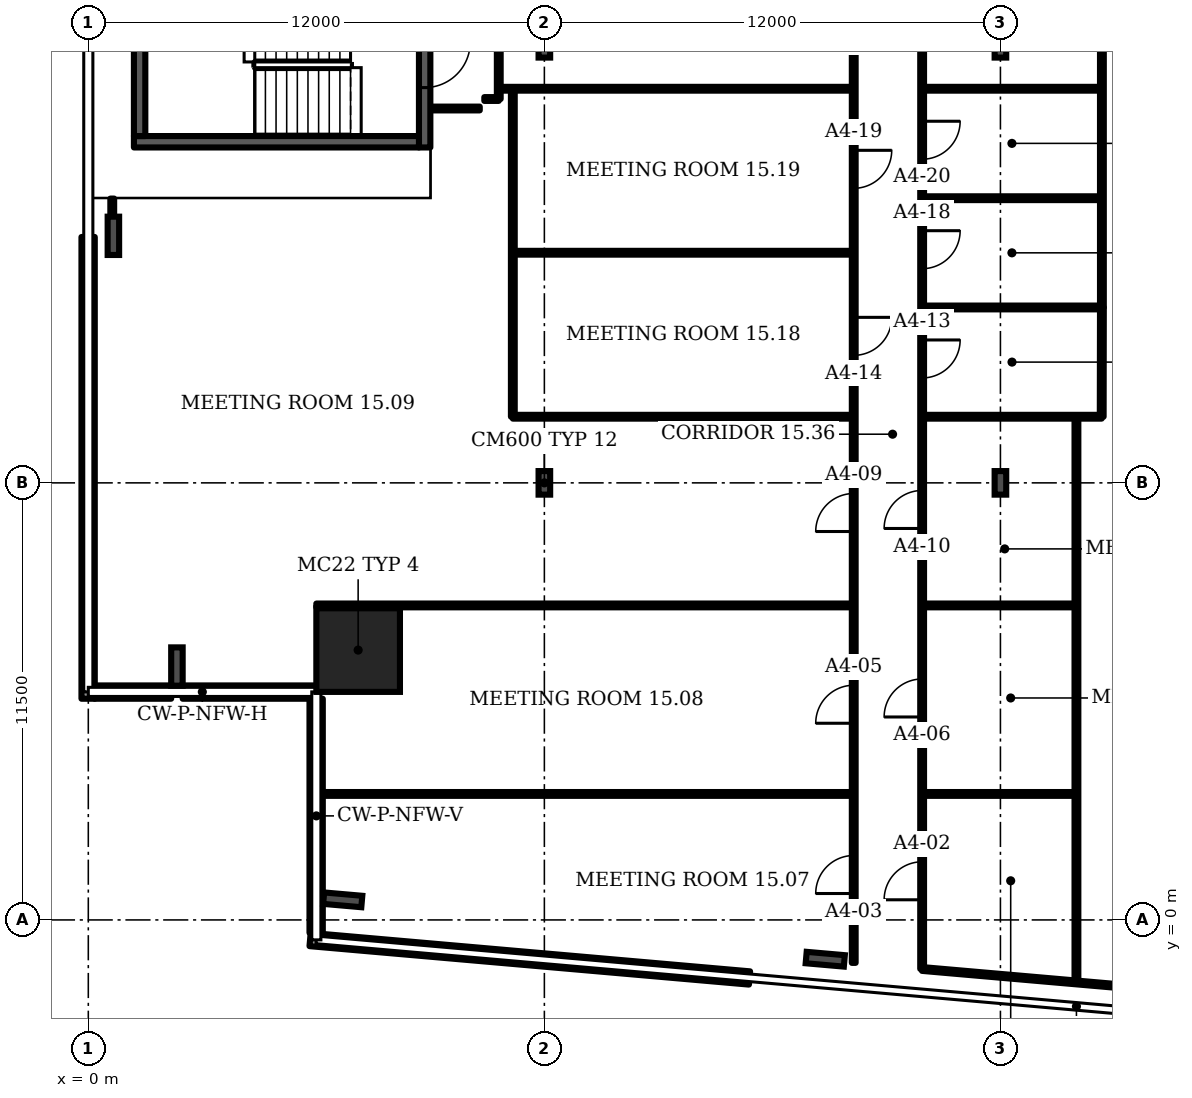
"""IFC4 building model, lengths in metres.
Left out: names, types, materials, properties, quantities, classifications, styles, units other than length and angle.
Written with IfcOpenShell. Run it as: python <this file> out.ifc"""

import sys

from ifc_helpers import new_model, si_unit, direction, frame, frame_2d, origin, origin_2d, place, context, subcontext, project, spatial, rectangle, i_section, extrude, element, fill, save


model = new_model("IFC4")
c1 = context("Model", 3, precision=1e-05, world=origin(), true_north=direction((0.0, 1.0)))
c2 = subcontext(c1, "Body", "Model", "MODEL_VIEW")
j1 = project(units=[si_unit("LENGTHUNIT", "METRE"), si_unit("PLANEANGLEUNIT", "RADIAN")], contexts=[c1])
p1 = place(None, origin())
s1 = spatial("IfcSite", under=j1, at=p1, CompositionType="ELEMENT")
p2 = place(p1, origin())
s2 = spatial("IfcBuilding", under=s1, at=p2, CompositionType="ELEMENT")
p3 = place(p2, frame((0.0, 0.0, 73.9)))
s3 = spatial("IfcBuildingStorey", under=s2, at=p3, CompositionType="ELEMENT", Elevation=73.9)
p4 = place(p3, frame((7.1, 7.1, 0.0), z_axis=(0.0, 0.0, 1.0), x_axis=(1.0, 0.0, 0.0)))
e1 = element("IfcColumn", 1, at=p4, inside=s3, PredefinedType="COLUMN", context=c2, shape_type="SweptSolid", body=[
    extrude(rectangle(XDim=2.2, YDim=2.2, at=origin_2d()), origin(), (0.0, 0.0, 1.0), 3.6),
])
for number, where, z_axis, x_axis in (
    (2, (6.694, 0.529, 0.0), (0.0, 0.0, 1.0), (-0.087, -0.996, 0.0)),
    (3, (19.391, -1.034, 0.0), (0.0, 0.0, 1.0), (-0.087, -0.996, 0.0)),
    (4, (0.66, 18.0, 0.0), (0.0, 0.0, 1.0), (-1.0, 0.0, 0.0)),
    (5, (2.332, 6.667, 0.0), (0.0, 0.0, 1.0), (-1.0, 0.0, 0.0)),
):
    element("IfcColumn", number, at=place(p3, frame(where, z_axis=z_axis, x_axis=x_axis)), inside=s3, PredefinedType="COLUMN", context=c2, shape_type="SweptSolid", body=[
        extrude(i_section(OverallWidth=0.302, OverallDepth=1.008, WebThickness=0.021, FlangeThickness=0.04, FilletRadius=0.03, at=origin_2d()), origin(), (0.0, 0.0, 1.0), 3.6),
    ])
for number, where, z_axis, x_axis in (
    (6, (12.0, 11.5, 0.0), (0.0, 0.0, 1.0), (1.0, 0.0, 0.0)),
    (7, (24.0, 11.5, 0.0), (0.0, 0.0, 1.0), (1.0, 0.0, 0.0)),
    (8, (12.0, 23.0, 0.0), (0.0, 0.0, 1.0), (1.0, 0.0, 0.0)),
    (9, (24.0, 23.0, 0.0), (0.0, 0.0, 1.0), (1.0, 0.0, 0.0)),
):
    element("IfcColumn", number, at=place(p3, frame(where, z_axis=z_axis, x_axis=x_axis)), inside=s3, PredefinedType="COLUMN", context=c2, shape_type="SweptSolid", body=[
        extrude(i_section(OverallWidth=0.305, OverallDepth=0.62, WebThickness=0.021, FlangeThickness=0.04, FilletRadius=0.027, at=origin_2d()), origin(), (0.0, 0.0, 1.0), 3.6),
    ])
p5 = place(p3, frame((5.835, -0.516, 0.0), z_axis=(0.0, 0.0, 1.0), x_axis=(0.996192, -0.087142, 0.0)))
e10 = element("IfcWall", 10, at=p5, inside=s3, PredefinedType="SOLIDWALL", context=c2, shape_type="SweptSolid", body=[
    extrude(rectangle(XDim=11.607, YDim=0.35, at=frame_2d((5.804, 0.0))), origin(), (0.0, 0.0, 1.0), 1.0),
])
p6 = place(p3, frame((-0.005, 17.97, 0.0), z_axis=(0.0, 0.0, 1.0), x_axis=(0.0, -1.0, 0.0)))
e11 = element("IfcWall", 11, at=p6, inside=s3, PredefinedType="SOLIDWALL", context=c2, shape_type="SweptSolid", body=[
    extrude(rectangle(XDim=12.15, YDim=0.35, at=frame_2d((6.075, 0.0))), origin(), (0.0, 0.0, 1.0), 1.0),
])
p7 = place(p3, frame((0.17, 5.995, 0.0), z_axis=(0.0, 0.0, 1.0), x_axis=(1.0, 0.0, 0.0)))
e12 = element("IfcWall", 12, at=p7, inside=s3, PredefinedType="SOLIDWALL", context=c2, shape_type="SweptSolid", body=[
    extrude(rectangle(XDim=2.011, YDim=0.35, at=frame_2d((1.005, 0.0))), origin(), (0.0, 0.0, 1.0), 1.0),
])
p8 = place(p3, frame((2.483, 5.995, 0.0), z_axis=(0.0, 0.0, 1.0), x_axis=(1.0, 0.0, 0.0)))
e13 = element("IfcWall", 13, at=p8, inside=s3, PredefinedType="SOLIDWALL", context=c2, shape_type="SweptSolid", body=[
    extrude(rectangle(XDim=3.517, YDim=0.35, at=frame_2d((1.759, 0.0))), origin(), (0.0, 0.0, 1.0), 1.0),
])
p9 = place(p3, frame((5.995, 5.82, 0.0), z_axis=(0.0, 0.0, 1.0), x_axis=(0.0, -1.0, 0.0)))
e14 = element("IfcWall", 14, at=p9, inside=s3, PredefinedType="SOLIDWALL", context=c2, shape_type="SweptSolid", body=[
    extrude(rectangle(XDim=6.161, YDim=0.35, at=frame_2d((3.081, 0.0))), origin(), (0.0, 0.0, 1.0), 1.0),
])
p10 = place(p3, frame((8.85, 20.325, 0.0), z_axis=(0.0, 0.0, 1.0), x_axis=(0.0, 1.0, 0.0)))
e15 = element("IfcWall", 15, at=p10, inside=s3, PredefinedType="SHEAR", context=c2, shape_type="SweptSolid", body=[
    extrude(rectangle(XDim=4.35, YDim=0.3, at=frame_2d((2.175, 0.0))), origin(), (0.0, 0.0, 1.0), 3.2),
])
p11 = place(p10, frame((1.575, 0.0, 0.0)))
e16 = element("IfcOpeningElement", 16, at=p11, cuts=e15, PredefinedType="OPENING", context=c2, shape_type="SweptSolid", body=[
    extrude(rectangle(XDim=1.2, YDim=2.1, at=frame_2d((0.6, 1.05))), frame((0.0, 0.16, 0.0), z_axis=(0.0, -1.0, 0.0), x_axis=(1.0, 0.0, 0.0)), (0.0, 0.0, 1.0), 0.32),
])
p12 = place(p3, frame((0.63, 17.5, 0.0), z_axis=(0.0, 0.0, 1.0), x_axis=(0.0, 1.0, 0.0)))
e17 = element("IfcWall", 17, at=p12, inside=s3, PredefinedType="PARTITIONING", context=c2, shape_type="SweptSolid", body=[
    extrude(rectangle(XDim=1.48, YDim=0.1, at=frame_2d((0.74, 0.0))), origin(), (0.0, 0.0, 1.0), 2.58),
])
p13 = place(p3, frame((6.0, 8.275, 0.0), z_axis=(0.0, 0.0, 1.0), x_axis=(1.0, 0.0, 0.0)))
e18 = element("IfcWall", 18, at=p13, inside=s3, PredefinedType="PARTITIONING", context=c2, shape_type="SweptSolid", body=[
    extrude(rectangle(XDim=14.14, YDim=0.1, at=frame_2d((7.07, 0.0))), origin(), (0.0, 0.0, 1.0), 3.2),
])
p14 = place(p3, frame((6.02, 3.315, 0.0), z_axis=(0.0, 0.0, 1.0), x_axis=(1.0, 0.0, 0.0)))
e19 = element("IfcWall", 19, at=p14, inside=s3, PredefinedType="PARTITIONING", context=c2, shape_type="SweptSolid", body=[
    extrude(rectangle(XDim=14.12, YDim=0.1, at=frame_2d((7.06, 0.0))), origin(), (0.0, 0.0, 1.0), 3.2),
])
p15 = place(p3, frame((9.02, 21.35, 0.0), z_axis=(0.0, 0.0, 1.0), x_axis=(1.0, 0.0, 0.0)))
e20 = element("IfcWall", 20, at=p15, inside=s3, PredefinedType="PARTITIONING", context=c2, shape_type="SweptSolid", body=[
    extrude(rectangle(XDim=1.28, YDim=0.1, at=frame_2d((0.64, 0.0))), origin(), (0.0, 0.0, 1.0), 3.2),
])
p16 = place(p3, frame((10.42, 21.6, 0.0), z_axis=(0.0, 0.0, 1.0), x_axis=(1.0, 0.0, 0.0)))
e21 = element("IfcWall", 21, at=p16, inside=s3, PredefinedType="PARTITIONING", context=c2, shape_type="SweptSolid", body=[
    extrude(rectangle(XDim=0.38, YDim=0.1, at=frame_2d((0.19, 0.0))), origin(), (0.0, 0.0, 1.0), 3.2),
])
p17 = place(p3, frame((10.8, 21.6, 0.0), z_axis=(0.0, 0.0, 1.0), x_axis=(0.0, 1.0, 0.0)))
e22 = element("IfcWall", 22, at=p17, inside=s3, PredefinedType="PARTITIONING", context=c2, shape_type="SweptSolid", body=[
    extrude(rectangle(XDim=8.9, YDim=0.1, at=frame_2d((4.45, 0.0))), origin(), (0.0, 0.0, 1.0), 3.2),
])
p18 = place(p3, frame((10.8, 21.87, 0.0), z_axis=(0.0, 0.0, 1.0), x_axis=(1.0, 0.0, 0.0)))
e23 = element("IfcWall", 23, at=p18, inside=s3, PredefinedType="PARTITIONING", context=c2, shape_type="SweptSolid", body=[
    extrude(rectangle(XDim=9.34, YDim=0.1, at=frame_2d((4.67, 0.0))), origin(), (0.0, 0.0, 1.0), 3.2),
])
p19 = place(p3, frame((11.17, 13.24, 0.0), z_axis=(0.0, 0.0, 1.0), x_axis=(0.0, 1.0, 0.0)))
e24 = element("IfcWall", 24, at=p19, inside=s3, PredefinedType="PARTITIONING", context=c2, shape_type="SweptSolid", body=[
    extrude(rectangle(XDim=8.63, YDim=0.1, at=frame_2d((4.315, 0.0))), origin(), (0.0, 0.0, 1.0), 3.2),
])
for number, where, z_axis, x_axis in (
    (25, (11.17, 13.24, 0.0), (0.0, 0.0, 1.0), (1.0, 0.0, 0.0)),
    (26, (11.17, 17.555, 0.0), (0.0, 0.0, 1.0), (1.0, 0.0, 0.0)),
):
    element("IfcWall", number, at=place(p3, frame(where, z_axis=z_axis, x_axis=x_axis)), inside=s3, PredefinedType="PARTITIONING", context=c2, shape_type="SweptSolid", body=[
        extrude(rectangle(XDim=8.97, YDim=0.1, at=frame_2d((4.485, 0.0))), origin(), (0.0, 0.0, 1.0), 3.2),
    ])
p20 = place(p3, frame((20.14, -1.13, 0.0), z_axis=(0.0, 0.0, 1.0), x_axis=(0.0, 1.0, 0.0)))
e27 = element("IfcWall", 27, at=p20, inside=s3, PredefinedType="PARTITIONING", context=c2, shape_type="SweptSolid", body=[
    extrude(rectangle(XDim=31.63, YDim=0.1, at=frame_2d((15.815, 0.0))), origin(), (0.0, 0.0, 1.0), 3.2),
])
p21 = place(p20, frame((1.825, 0.0, 0.0)))
e28 = element("IfcOpeningElement", 28, at=p21, cuts=e27, PredefinedType="OPENING", context=c2, shape_type="SweptSolid", body=[
    extrude(rectangle(XDim=1.0, YDim=2.1, at=frame_2d((0.5, 1.05))), frame((0.0, 0.06, 0.0), z_axis=(0.0, -1.0, 0.0), x_axis=(1.0, 0.0, 0.0)), (0.0, 0.0, 1.0), 0.12),
])
p22 = place(p20, frame((6.305, 0.0, 0.0)))
e29 = element("IfcOpeningElement", 29, at=p22, cuts=e27, PredefinedType="OPENING", context=c2, shape_type="SweptSolid", body=[
    extrude(rectangle(XDim=1.0, YDim=2.1, at=frame_2d((0.5, 1.05))), frame((0.0, 0.06, 0.0), z_axis=(0.0, -1.0, 0.0), x_axis=(1.0, 0.0, 0.0)), (0.0, 0.0, 1.0), 0.12),
])
p23 = place(p20, frame((11.35, 0.0, 0.0)))
e30 = element("IfcOpeningElement", 30, at=p23, cuts=e27, PredefinedType="OPENING", context=c2, shape_type="SweptSolid", body=[
    extrude(rectangle(XDim=1.0, YDim=2.1, at=frame_2d((0.5, 1.05))), frame((0.0, 0.06, 0.0), z_axis=(0.0, -1.0, 0.0), x_axis=(1.0, 0.0, 0.0)), (0.0, 0.0, 1.0), 0.12),
])
p24 = place(p20, frame((15.985, 0.0, 0.0)))
e31 = element("IfcOpeningElement", 31, at=p24, cuts=e27, PredefinedType="OPENING", context=c2, shape_type="SweptSolid", body=[
    extrude(rectangle(XDim=1.0, YDim=2.1, at=frame_2d((0.5, 1.05))), frame((0.0, 0.06, 0.0), z_axis=(0.0, -1.0, 0.0), x_axis=(1.0, 0.0, 0.0)), (0.0, 0.0, 1.0), 0.12),
])
p25 = place(p20, frame((20.38, 0.0, 0.0)))
e32 = element("IfcOpeningElement", 32, at=p25, cuts=e27, PredefinedType="OPENING", context=c2, shape_type="SweptSolid", body=[
    extrude(rectangle(XDim=1.0, YDim=2.1, at=frame_2d((0.5, 1.05))), frame((0.0, 0.06, 0.0), z_axis=(0.0, -1.0, 0.0), x_axis=(1.0, 0.0, 0.0)), (0.0, 0.0, 1.0), 0.12),
])
p26 = place(p20, frame((24.695, 0.0, 0.0)))
e33 = element("IfcOpeningElement", 33, at=p26, cuts=e27, PredefinedType="OPENING", context=c2, shape_type="SweptSolid", body=[
    extrude(rectangle(XDim=1.0, YDim=2.1, at=frame_2d((0.5, 1.05))), frame((0.0, 0.06, 0.0), z_axis=(0.0, -1.0, 0.0), x_axis=(1.0, 0.0, 0.0)), (0.0, 0.0, 1.0), 0.12),
])
p27 = place(p3, frame((21.94, -1.29, 0.0), z_axis=(0.0, 0.0, 1.0), x_axis=(0.0, 1.0, 0.0)))
e34 = element("IfcWall", 34, at=p27, inside=s3, PredefinedType="PARTITIONING", context=c2, shape_type="SweptSolid", body=[
    extrude(rectangle(XDim=31.79, YDim=0.1, at=frame_2d((15.895, 0.0))), origin(), (0.0, 0.0, 1.0), 3.2),
])
p28 = place(p27, frame((1.82, 0.0, 0.0)))
e35 = element("IfcOpeningElement", 35, at=p28, cuts=e34, PredefinedType="OPENING", context=c2, shape_type="SweptSolid", body=[
    extrude(rectangle(XDim=1.0, YDim=2.1, at=frame_2d((0.5, 1.05))), frame((0.0, 0.06, 0.0), z_axis=(0.0, -1.0, 0.0), x_axis=(1.0, 0.0, 0.0)), (0.0, 0.0, 1.0), 0.12),
])
p29 = place(p27, frame((6.63, 0.0, 0.0)))
e36 = element("IfcOpeningElement", 36, at=p29, cuts=e34, PredefinedType="OPENING", context=c2, shape_type="SweptSolid", body=[
    extrude(rectangle(XDim=1.0, YDim=2.1, at=frame_2d((0.5, 1.05))), frame((0.0, 0.06, 0.0), z_axis=(0.0, -1.0, 0.0), x_axis=(1.0, 0.0, 0.0)), (0.0, 0.0, 1.0), 0.12),
])
p30 = place(p27, frame((11.59, 0.0, 0.0)))
e37 = element("IfcOpeningElement", 37, at=p30, cuts=e34, PredefinedType="OPENING", context=c2, shape_type="SweptSolid", body=[
    extrude(rectangle(XDim=1.0, YDim=2.1, at=frame_2d((0.5, 1.05))), frame((0.0, 0.06, 0.0), z_axis=(0.0, -1.0, 0.0), x_axis=(1.0, 0.0, 0.0)), (0.0, 0.0, 1.0), 0.12),
])
p31 = place(p27, frame((15.55, 0.0, 0.0)))
e38 = element("IfcOpeningElement", 38, at=p31, cuts=e34, PredefinedType="OPENING", context=c2, shape_type="SweptSolid", body=[
    extrude(rectangle(XDim=1.0, YDim=2.1, at=frame_2d((0.5, 1.05))), frame((0.0, 0.06, 0.0), z_axis=(0.0, -1.0, 0.0), x_axis=(1.0, 0.0, 0.0)), (0.0, 0.0, 1.0), 0.12),
])
p32 = place(p27, frame((18.425, 0.0, 0.0)))
e39 = element("IfcOpeningElement", 39, at=p32, cuts=e34, PredefinedType="OPENING", context=c2, shape_type="SweptSolid", body=[
    extrude(rectangle(XDim=1.0, YDim=2.1, at=frame_2d((0.5, 1.05))), frame((0.0, 0.06, 0.0), z_axis=(0.0, -1.0, 0.0), x_axis=(1.0, 0.0, 0.0)), (0.0, 0.0, 1.0), 0.12),
])
p33 = place(p27, frame((21.305, 0.0, 0.0)))
e40 = element("IfcOpeningElement", 40, at=p33, cuts=e34, PredefinedType="OPENING", context=c2, shape_type="SweptSolid", body=[
    extrude(rectangle(XDim=1.0, YDim=2.1, at=frame_2d((0.5, 1.05))), frame((0.0, 0.06, 0.0), z_axis=(0.0, -1.0, 0.0), x_axis=(1.0, 0.0, 0.0)), (0.0, 0.0, 1.0), 0.12),
])
p34 = place(p27, frame((24.18, 0.0, 0.0)))
e41 = element("IfcOpeningElement", 41, at=p34, cuts=e34, PredefinedType="OPENING", context=c2, shape_type="SweptSolid", body=[
    extrude(rectangle(XDim=1.0, YDim=2.1, at=frame_2d((0.5, 1.05))), frame((0.0, 0.06, 0.0), z_axis=(0.0, -1.0, 0.0), x_axis=(1.0, 0.0, 0.0)), (0.0, 0.0, 1.0), 0.12),
])
p35 = place(p27, frame((27.055, 0.0, 0.0)))
e42 = element("IfcOpeningElement", 42, at=p35, cuts=e34, PredefinedType="OPENING", context=c2, shape_type="SweptSolid", body=[
    extrude(rectangle(XDim=1.0, YDim=2.1, at=frame_2d((0.5, 1.05))), frame((0.0, 0.06, 0.0), z_axis=(0.0, -1.0, 0.0), x_axis=(1.0, 0.0, 0.0)), (0.0, 0.0, 1.0), 0.12),
])
for number, where, z_axis, x_axis in (
    (43, (21.94, 3.315, 0.0), (0.0, 0.0, 1.0), (1.0, 0.0, 0.0)),
    (44, (21.94, 8.275, 0.0), (0.0, 0.0, 1.0), (1.0, 0.0, 0.0)),
):
    element("IfcWall", number, at=place(p3, frame(where, z_axis=z_axis, x_axis=x_axis)), inside=s3, PredefinedType="PARTITIONING", context=c2, shape_type="SweptSolid", body=[
        extrude(rectangle(XDim=4.06, YDim=0.1, at=frame_2d((2.03, 0.0))), origin(), (0.0, 0.0, 1.0), 3.2),
    ])
for number, where, z_axis, x_axis in (
    (45, (21.94, 13.24, 0.0), (0.0, 0.0, 1.0), (1.0, 0.0, 0.0)),
    (46, (21.94, 16.115, 0.0), (0.0, 0.0, 1.0), (1.0, 0.0, 0.0)),
    (47, (21.94, 18.99, 0.0), (0.0, 0.0, 1.0), (1.0, 0.0, 0.0)),
    (48, (21.94, 21.87, 0.0), (0.0, 0.0, 1.0), (1.0, 0.0, 0.0)),
):
    element("IfcWall", number, at=place(p3, frame(where, z_axis=z_axis, x_axis=x_axis)), inside=s3, PredefinedType="PARTITIONING", context=c2, shape_type="SweptSolid", body=[
        extrude(rectangle(XDim=4.725, YDim=0.1, at=frame_2d((2.363, 0.0))), origin(), (0.0, 0.0, 1.0), 3.2),
    ])
p36 = place(p3, frame((26.0, -1.645, 0.0), z_axis=(0.0, 0.0, 1.0), x_axis=(0.0, 1.0, 0.0)))
e49 = element("IfcWall", 49, at=p36, inside=s3, PredefinedType="PARTITIONING", context=c2, shape_type="SweptSolid", body=[
    extrude(rectangle(XDim=14.885, YDim=0.1, at=frame_2d((7.442, 0.0))), origin(), (0.0, 0.0, 1.0), 3.2),
])
p37 = place(p3, frame((26.665, 13.24, 0.0), z_axis=(0.0, 0.0, 1.0), x_axis=(0.001698, 0.999995, 0.0)))
e50 = element("IfcWall", 50, at=p37, inside=s3, PredefinedType="PARTITIONING", context=c2, shape_type="SweptSolid", body=[
    extrude(rectangle(XDim=2.875, YDim=0.1, at=frame_2d((1.438, 0.0))), origin(), (0.0, 0.0, 1.0), 3.2),
])
p38 = place(p3, frame((26.67, 16.115, 0.0), z_axis=(0.0, 0.0, 1.0), x_axis=(0.0, 1.0, 0.0)))
e51 = element("IfcWall", 51, at=p38, inside=s3, PredefinedType="PARTITIONING", context=c2, shape_type="SweptSolid", body=[
    extrude(rectangle(XDim=14.385, YDim=0.1, at=frame_2d((7.192, 0.0))), origin(), (0.0, 0.0, 1.0), 3.2),
])
p39 = place(p3, frame((33.22, -2.275, 0.0), z_axis=(0.0, 0.0, 1.0), x_axis=(-0.996212, 0.086913, 0.0)))
e52 = element("IfcWall", 52, at=p39, inside=s3, PredefinedType="PARTITIONING", context=c2, shape_type="SweptSolid", body=[
    extrude(rectangle(XDim=11.323, YDim=0.1, at=frame_2d((5.662, 0.0))), origin(), (0.0, 0.0, 1.0), 2.58),
])
p40 = place(p3, frame((1.2, 20.475, 0.0), z_axis=(0.0, 0.0, 1.0), x_axis=(1.0, 0.0, 0.0)))
e53 = element("IfcWall", 53, at=p40, inside=s3, PredefinedType="SHEAR", context=c2, shape_type="SweptSolid", body=[
    extrude(rectangle(XDim=7.5, YDim=0.3, at=frame_2d((3.75, 0.0))), origin(), (0.0, 0.0, 1.0), 3.2),
])
p41 = place(p3, frame((1.35, 20.625, 0.0), z_axis=(0.0, 0.0, 1.0), x_axis=(0.0, 1.0, 0.0)))
e54 = element("IfcWall", 54, at=p41, inside=s3, PredefinedType="SHEAR", context=c2, shape_type="SweptSolid", body=[
    extrude(rectangle(XDim=3.75, YDim=0.3, at=frame_2d((1.875, 0.0))), origin(), (0.0, 0.0, 1.0), 3.2),
])
p42 = place(p11, origin())
e55 = element("IfcDoor", 55, at=p42, inside=s3, OperationType="SINGLE_SWING_RIGHT", PredefinedType="DOOR", context=c2, shape_type="SweptSolid", body=[
    extrude(rectangle(XDim=1.2, YDim=2.1, at=frame_2d((0.6, 1.05))), frame((0.0, 0.025, 0.0), z_axis=(0.0, -1.0, 0.0), x_axis=(1.0, 0.0, 0.0)), (0.0, 0.0, 1.0), 0.05),
])
fill(e16, e55)
p43 = place(p28, origin())
e56 = element("IfcDoor", 56, at=p43, inside=s3, OperationType="SINGLE_SWING_LEFT", PredefinedType="DOOR", context=c2, shape_type="SweptSolid", body=[
    extrude(rectangle(XDim=1.0, YDim=2.1, at=frame_2d((0.5, 1.05))), frame((0.0, 0.025, 0.0), z_axis=(0.0, -1.0, 0.0), x_axis=(1.0, 0.0, 0.0)), (0.0, 0.0, 1.0), 0.05),
])
fill(e35, e56)
p44 = place(p21, origin())
e57 = element("IfcDoor", 57, at=p44, inside=s3, OperationType="SINGLE_SWING_LEFT", PredefinedType="DOOR", context=c2, shape_type="SweptSolid", body=[
    extrude(rectangle(XDim=1.0, YDim=2.1, at=frame_2d((0.5, 1.05))), frame((0.0, 0.025, 0.0), z_axis=(0.0, -1.0, 0.0), x_axis=(1.0, 0.0, 0.0)), (0.0, 0.0, 1.0), 0.05),
])
fill(e28, e57)
p45 = place(p22, origin())
e58 = element("IfcDoor", 58, at=p45, inside=s3, OperationType="SINGLE_SWING_LEFT", PredefinedType="DOOR", context=c2, shape_type="SweptSolid", body=[
    extrude(rectangle(XDim=1.0, YDim=2.1, at=frame_2d((0.5, 1.05))), frame((0.0, 0.025, 0.0), z_axis=(0.0, -1.0, 0.0), x_axis=(1.0, 0.0, 0.0)), (0.0, 0.0, 1.0), 0.05),
])
fill(e29, e58)
p46 = place(p29, origin())
e59 = element("IfcDoor", 59, at=p46, inside=s3, OperationType="SINGLE_SWING_LEFT", PredefinedType="DOOR", context=c2, shape_type="SweptSolid", body=[
    extrude(rectangle(XDim=1.0, YDim=2.1, at=frame_2d((0.5, 1.05))), frame((0.0, 0.025, 0.0), z_axis=(0.0, -1.0, 0.0), x_axis=(1.0, 0.0, 0.0)), (0.0, 0.0, 1.0), 0.05),
])
fill(e36, e59)
p47 = place(p23, origin())
e60 = element("IfcDoor", 60, at=p47, inside=s3, OperationType="SINGLE_SWING_LEFT", PredefinedType="DOOR", context=c2, shape_type="SweptSolid", body=[
    extrude(rectangle(XDim=1.0, YDim=2.1, at=frame_2d((0.5, 1.05))), frame((0.0, 0.025, 0.0), z_axis=(0.0, -1.0, 0.0), x_axis=(1.0, 0.0, 0.0)), (0.0, 0.0, 1.0), 0.05),
])
fill(e30, e60)
p48 = place(p30, origin())
e61 = element("IfcDoor", 61, at=p48, inside=s3, OperationType="SINGLE_SWING_LEFT", PredefinedType="DOOR", context=c2, shape_type="SweptSolid", body=[
    extrude(rectangle(XDim=1.0, YDim=2.1, at=frame_2d((0.5, 1.05))), frame((0.0, 0.025, 0.0), z_axis=(0.0, -1.0, 0.0), x_axis=(1.0, 0.0, 0.0)), (0.0, 0.0, 1.0), 0.05),
])
fill(e37, e61)
p49 = place(p31, origin())
e62 = element("IfcDoor", 62, at=p49, inside=s3, OperationType="SINGLE_SWING_RIGHT", PredefinedType="DOOR", context=c2, shape_type="SweptSolid", body=[
    extrude(rectangle(XDim=1.0, YDim=2.1, at=frame_2d((0.5, 1.05))), frame((0.0, 0.025, 0.0), z_axis=(0.0, -1.0, 0.0), x_axis=(1.0, 0.0, 0.0)), (0.0, 0.0, 1.0), 0.05),
])
fill(e38, e62)
p50 = place(p24, origin())
e63 = element("IfcDoor", 63, at=p50, inside=s3, OperationType="SINGLE_SWING_RIGHT", PredefinedType="DOOR", context=c2, shape_type="SweptSolid", body=[
    extrude(rectangle(XDim=1.0, YDim=2.1, at=frame_2d((0.5, 1.05))), frame((0.0, 0.025, 0.0), z_axis=(0.0, -1.0, 0.0), x_axis=(1.0, 0.0, 0.0)), (0.0, 0.0, 1.0), 0.05),
])
fill(e31, e63)
p51 = place(p32, origin())
e64 = element("IfcDoor", 64, at=p51, inside=s3, OperationType="SINGLE_SWING_RIGHT", PredefinedType="DOOR", context=c2, shape_type="SweptSolid", body=[
    extrude(rectangle(XDim=1.0, YDim=2.1, at=frame_2d((0.5, 1.05))), frame((0.0, 0.025, 0.0), z_axis=(0.0, -1.0, 0.0), x_axis=(1.0, 0.0, 0.0)), (0.0, 0.0, 1.0), 0.05),
])
fill(e39, e64)
p52 = place(p25, origin())
e65 = element("IfcDoor", 65, at=p52, inside=s3, OperationType="SINGLE_SWING_RIGHT", PredefinedType="DOOR", context=c2, shape_type="SweptSolid", body=[
    extrude(rectangle(XDim=1.0, YDim=2.1, at=frame_2d((0.5, 1.05))), frame((0.0, 0.025, 0.0), z_axis=(0.0, -1.0, 0.0), x_axis=(1.0, 0.0, 0.0)), (0.0, 0.0, 1.0), 0.05),
])
fill(e32, e65)
p53 = place(p33, origin())
e66 = element("IfcDoor", 66, at=p53, inside=s3, OperationType="SINGLE_SWING_RIGHT", PredefinedType="DOOR", context=c2, shape_type="SweptSolid", body=[
    extrude(rectangle(XDim=1.0, YDim=2.1, at=frame_2d((0.5, 1.05))), frame((0.0, 0.025, 0.0), z_axis=(0.0, -1.0, 0.0), x_axis=(1.0, 0.0, 0.0)), (0.0, 0.0, 1.0), 0.05),
])
fill(e40, e66)
save(model, sys.argv[1])
